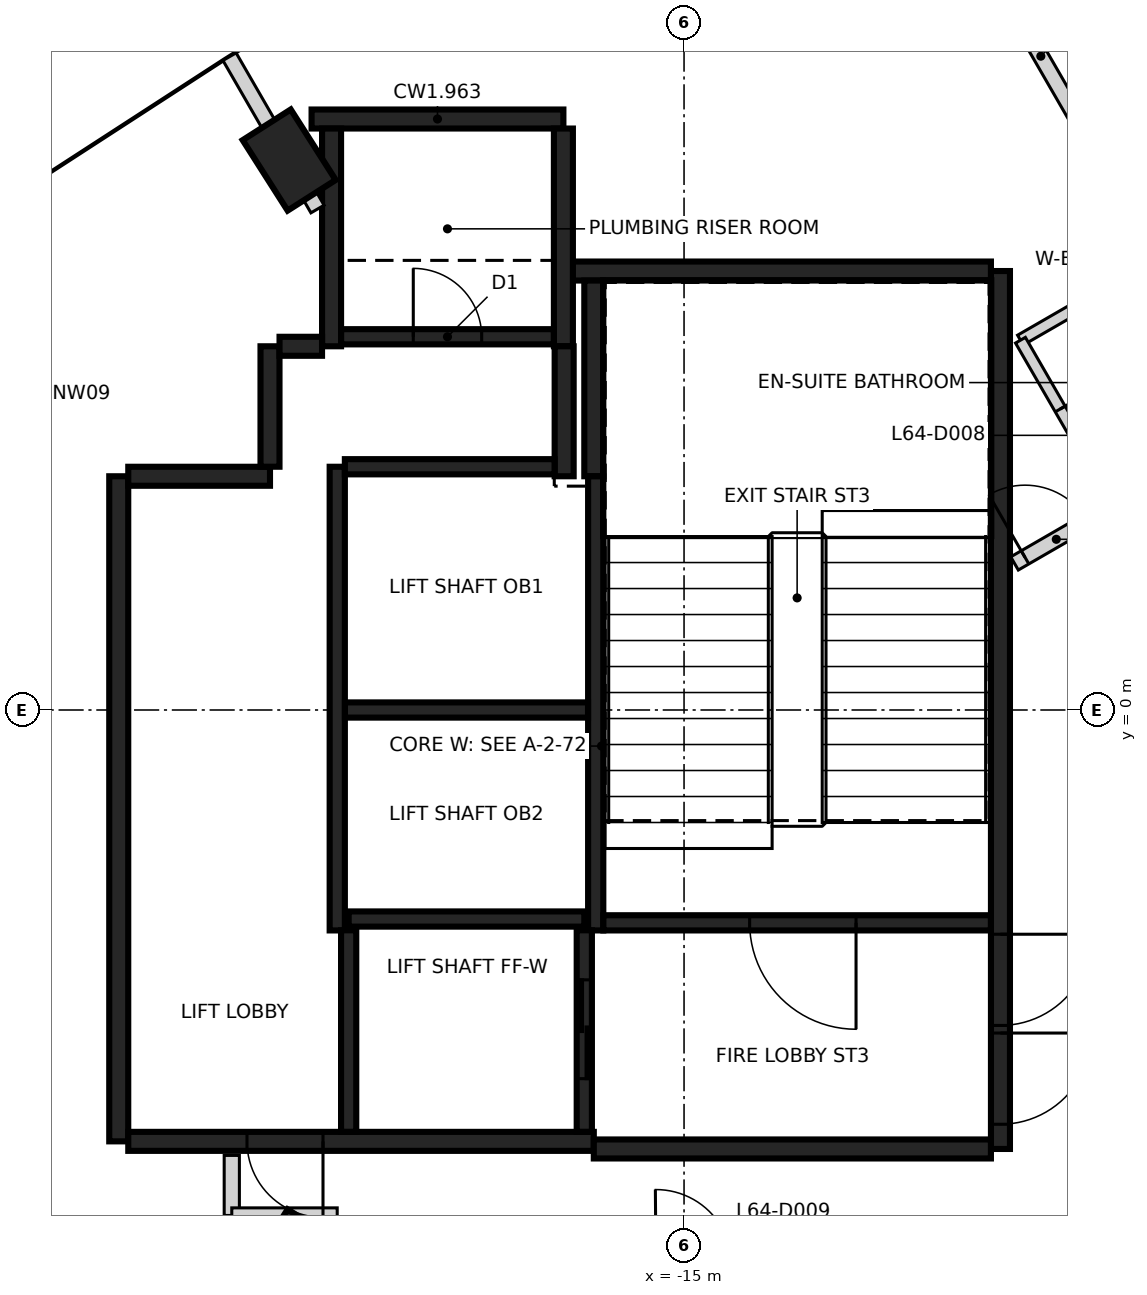
"""IFC4 building model, lengths in metres.
Left out: names, types, materials, properties, quantities, classifications, styles, units other than length and angle.
Written with IfcOpenShell. Run it as: python <this file> out.ifc"""

import sys

from ifc_helpers import new_model, si_unit, direction, frame, frame_2d, origin, origin_2d, place, context, subcontext, project, spatial, rectangle, extrude, element, fill, save


model = new_model("IFC4")
c1 = context("Model", 3, precision=1e-05, world=origin(), true_north=direction((0.0, 1.0)))
c2 = subcontext(c1, "Body", "Model", "MODEL_VIEW")
j1 = project(units=[si_unit("LENGTHUNIT", "METRE"), si_unit("PLANEANGLEUNIT", "RADIAN")], contexts=[c1])
p1 = place(None, origin())
s1 = spatial("IfcSite", under=j1, at=p1, CompositionType="ELEMENT")
p2 = place(p1, origin())
s2 = spatial("IfcBuilding", under=s1, at=p2, CompositionType="ELEMENT")
p3 = place(p2, frame((0.0, 0.0, 253.8)))
s3 = spatial("IfcBuildingStorey", under=s2, at=p3, CompositionType="ELEMENT", Elevation=253.8)
for number, where, z_axis, x_axis in (
    (1, (-20.195, 7.235, -0.35), (0.0, 0.0, 1.0), (-0.538, 0.843, 0.0)),
    (2, (-20.195, -7.235, -0.35), (0.0, 0.0, 1.0), (0.538, 0.843, 0.0)),
):
    element("IfcColumn", number, at=place(p3, frame(where, z_axis=z_axis, x_axis=x_axis)), inside=s3, PredefinedType="COLUMN", context=c2, shape_type="SweptSolid", body=[
        extrude(rectangle(XDim=1.1, YDim=0.75, at=origin_2d()), origin(), (0.0, 0.0, 1.0), 2.64),
    ])
p4 = place(p3, frame((-10.837, 5.775, 0.0), z_axis=(0.0, 0.0, 1.0), x_axis=(0.0, -1.0, 0.0)))
e3 = element("IfcWall", 3, at=p4, inside=s3, PredefinedType="SHEAR", context=c2, shape_type="SweptSolid", body=[
    extrude(rectangle(XDim=11.55, YDim=0.25, at=frame_2d((5.775, 0.0))), origin(), (0.0, 0.0, 1.0), 3.2),
])
p5 = place(p4, frame((10.025, 0.0, 0.0)))
e4 = element("IfcOpeningElement", 4, at=p5, cuts=e3, PredefinedType="OPENING", context=c2, shape_type="SweptSolid", body=[
    extrude(rectangle(XDim=1.2, YDim=2.1, at=frame_2d((0.6, 1.05))), frame((0.0, 0.135, 0.0), z_axis=(0.0, -1.0, 0.0), x_axis=(1.0, 0.0, 0.0)), (0.0, 0.0, 1.0), 0.27),
])
p6 = place(p4, frame((8.725, 0.0, 0.0)))
e5 = element("IfcOpeningElement", 5, at=p6, cuts=e3, PredefinedType="OPENING", context=c2, shape_type="SweptSolid", body=[
    extrude(rectangle(XDim=1.2, YDim=2.1, at=frame_2d((0.6, 1.05))), frame((0.0, 0.135, 0.0), z_axis=(0.0, -1.0, 0.0), x_axis=(1.0, 0.0, 0.0)), (0.0, 0.0, 1.0), 0.27),
])
p7 = place(p3, frame((-22.437, -5.675, 0.0), z_axis=(0.0, 0.0, 1.0), x_axis=(0.0, 1.0, 0.0)))
e6 = element("IfcWall", 6, at=p7, inside=s3, PredefinedType="SHEAR", context=c2, shape_type="SweptSolid", body=[
    extrude(rectangle(XDim=8.75, YDim=0.25, at=frame_2d((4.375, 0.0))), origin(), (0.0, 0.0, 1.0), 3.2),
])
p8 = place(p3, frame((-16.187, -5.675, 0.0), z_axis=(0.0, 0.0, 1.0), x_axis=(-1.0, 0.0, 0.0)))
e7 = element("IfcWall", 7, at=p8, inside=s3, PredefinedType="SHEAR", context=c2, shape_type="SweptSolid", body=[
    extrude(rectangle(XDim=6.125, YDim=0.25, at=frame_2d((3.062, 0.0))), origin(), (0.0, 0.0, 1.0), 3.2),
])
p9 = place(p8, frame((3.563, 0.0, 0.0)))
e8 = element("IfcOpeningElement", 8, at=p9, cuts=e7, PredefinedType="OPENING", context=c2, shape_type="SweptSolid", body=[
    extrude(rectangle(XDim=1.0, YDim=2.1, at=frame_2d((0.5, 1.05))), frame((0.0, 0.135, 0.0), z_axis=(0.0, -1.0, 0.0), x_axis=(1.0, 0.0, 0.0)), (0.0, 0.0, 1.0), 0.27),
])
p10 = place(p3, frame((-10.963, -5.775, 0.0), z_axis=(0.0, 0.0, 1.0), x_axis=(-1.0, 0.0, 0.0)))
e9 = element("IfcWall", 9, at=p10, inside=s3, PredefinedType="SHEAR", context=c2, shape_type="SweptSolid", body=[
    extrude(rectangle(XDim=5.225, YDim=0.25, at=frame_2d((2.612, 0.0))), origin(), (0.0, 0.0, 1.0), 3.2),
])
p11 = place(p3, frame((-16.472, 5.775, 0.0), z_axis=(0.0, 0.0, 1.0), x_axis=(1.0, 0.0, 0.0)))
e10 = element("IfcWall", 10, at=p11, inside=s3, PredefinedType="SHEAR", context=c2, shape_type="SweptSolid", body=[
    extrude(rectangle(XDim=5.51, YDim=0.25, at=frame_2d((2.755, 0.0))), origin(), (0.0, 0.0, 1.0), 3.2),
])
p12 = place(p3, frame((-19.9, 7.775, 0.0), z_axis=(0.0, 0.0, 1.0), x_axis=(1.0, 0.0, 0.0)))
e11 = element("IfcWall", 11, at=p12, inside=s3, PredefinedType="SHEAR", context=c2, shape_type="SweptSolid", body=[
    extrude(rectangle(XDim=3.313, YDim=0.25, at=frame_2d((1.656, 0.0))), origin(), (0.0, 0.0, 1.0), 3.2),
])
for number, where, z_axis, x_axis in (
    (12, (-16.587, 7.65, 0.0), (0.0, 0.0, 1.0), (0.0, -1.0, 0.0)),
    (13, (-19.637, 4.785, 0.0), (0.0, 0.0, 1.0), (0.0, 1.0, 0.0)),
):
    element("IfcWall", number, at=place(p3, frame(where, z_axis=z_axis, x_axis=x_axis)), inside=s3, PredefinedType="SHEAR", context=c2, shape_type="SweptSolid", body=[
        extrude(rectangle(XDim=2.865, YDim=0.25, at=frame_2d((1.432, 0.0))), origin(), (0.0, 0.0, 1.0), 3.2),
    ])
p13 = place(p3, frame((-16.187, 3.075, 0.0), z_axis=(0.0, 0.0, 1.0), x_axis=(0.0, 1.0, 0.0)))
e14 = element("IfcWall", 14, at=p13, inside=s3, PredefinedType="SHEAR", context=c2, shape_type="SweptSolid", body=[
    extrude(rectangle(XDim=2.575, YDim=0.25, at=frame_2d((1.287, 0.0))), origin(), (0.0, 0.0, 1.0), 3.2),
])
p14 = place(p3, frame((-22.312, 3.075, 0.0), z_axis=(0.0, 0.0, 1.0), x_axis=(1.0, 0.0, 0.0)))
e15 = element("IfcWall", 15, at=p14, inside=s3, PredefinedType="SHEAR", context=c2, shape_type="SweptSolid", body=[
    extrude(rectangle(XDim=1.865, YDim=0.25, at=frame_2d((0.932, 0.0))), origin(), (0.0, 0.0, 1.0), 3.2),
])
p15 = place(p3, frame((-16.577, 4.785, 0.0), z_axis=(0.0, 0.0, 1.0), x_axis=(0.0, -1.0, 0.0)))
e16 = element("IfcWall", 16, at=p15, inside=s3, PredefinedType="SHEAR", context=c2, shape_type="SweptSolid", body=[
    extrude(rectangle(XDim=1.71, YDim=0.25, at=frame_2d((0.855, 0.0))), origin(), (0.0, 0.0, 1.0), 3.2),
])
p16 = place(p3, frame((-20.447, 3.2, 0.0), z_axis=(0.0, 0.0, 1.0), x_axis=(0.0, 1.0, 0.0)))
e17 = element("IfcWall", 17, at=p16, inside=s3, PredefinedType="SHEAR", context=c2, shape_type="SweptSolid", body=[
    extrude(rectangle(XDim=1.584, YDim=0.25, at=frame_2d((0.792, 0.0))), origin(), (0.0, 0.0, 1.0), 3.2),
])
p17 = place(p3, frame((-20.322, 4.785, 0.0), z_axis=(0.0, 0.0, 1.0), x_axis=(1.0, 0.0, 0.0)))
e18 = element("IfcWall", 18, at=p17, inside=s3, PredefinedType="SHEAR", context=c2, shape_type="SweptSolid", body=[
    extrude(rectangle(XDim=0.559, YDim=0.25, at=frame_2d((0.28, 0.0))), origin(), (0.0, 0.0, 1.0), 3.2),
])
p18 = place(p3, frame((-16.162, 3.074, 0.0), z_axis=(0.0, 0.0, 1.0), x_axis=(0.0, -1.0, 0.0)))
e19 = element("IfcWall", 19, at=p18, inside=s3, PredefinedType="SHEAR", context=c2, shape_type="SweptSolid", body=[
    extrude(rectangle(XDim=5.974, YDim=0.2, at=frame_2d((2.987, 0.0))), origin(), (0.0, 0.0, 1.0), 3.2),
])
p19 = place(p3, frame((-19.562, -2.9, 0.0), z_axis=(0.0, 0.0, 1.0), x_axis=(0.0, 1.0, 0.0)))
e20 = element("IfcWall", 20, at=p19, inside=s3, PredefinedType="SHEAR", context=c2, shape_type="SweptSolid", body=[
    extrude(rectangle(XDim=6.1, YDim=0.2, at=frame_2d((3.05, 0.0))), origin(), (0.0, 0.0, 1.0), 3.2),
])
p20 = place(p3, frame((-10.963, -2.8, 0.0), z_axis=(0.0, 0.0, 1.0), x_axis=(-1.0, 0.0, 0.0)))
e21 = element("IfcWall", 21, at=p20, inside=s3, PredefinedType="SHEAR", context=c2, shape_type="SweptSolid", body=[
    extrude(rectangle(XDim=5.098, YDim=0.2, at=frame_2d((2.549, 0.0))), origin(), (0.0, 0.0, 1.0), 3.2),
])
p21 = place(p20, frame((1.774, 0.0, 0.0)))
e22 = element("IfcOpeningElement", 22, at=p21, cuts=e21, PredefinedType="OPENING", context=c2, shape_type="SweptSolid", body=[
    extrude(rectangle(XDim=1.4, YDim=2.1, at=frame_2d((0.7, 1.05))), frame((0.0, 0.11, 0.0), z_axis=(0.0, -1.0, 0.0), x_axis=(1.0, 0.0, 0.0)), (0.0, 0.0, 1.0), 0.22),
])
p22 = place(p3, frame((-16.263, 0.0, 0.0), z_axis=(0.0, 0.0, 1.0), x_axis=(-1.0, 0.0, 0.0)))
e23 = element("IfcWall", 23, at=p22, inside=s3, PredefinedType="SHEAR", context=c2, shape_type="SweptSolid", body=[
    extrude(rectangle(XDim=3.198, YDim=0.2, at=frame_2d((1.599, 0.0))), origin(), (0.0, 0.0, 1.0), 3.2),
])
p23 = place(p3, frame((-19.511, 4.91, 0.0), z_axis=(0.0, 0.0, 1.0), x_axis=(1.0, 0.0, 0.0)))
e24 = element("IfcWall", 24, at=p23, inside=s3, PredefinedType="SHEAR", context=c2, shape_type="SweptSolid", body=[
    extrude(rectangle(XDim=2.798, YDim=0.2, at=frame_2d((1.399, 0.0))), origin(), (0.0, 0.0, 1.0), 3.2),
])
p24 = place(p23, frame((0.949, 0.0, 0.0)))
e25 = element("IfcOpeningElement", 25, at=p24, cuts=e24, PredefinedType="OPENING", context=c2, shape_type="SweptSolid", body=[
    extrude(rectangle(XDim=0.9, YDim=2.1, at=frame_2d((0.45, 1.05))), frame((0.0, 0.11, 0.0), z_axis=(0.0, -1.0, 0.0), x_axis=(1.0, 0.0, 0.0)), (0.0, 0.0, 1.0), 0.22),
])
p25 = place(p3, frame((-19.462, 3.2, 0.0), z_axis=(0.0, 0.0, 1.0), x_axis=(1.0, 0.0, 0.0)))
e26 = element("IfcWall", 26, at=p25, inside=s3, PredefinedType="SHEAR", context=c2, shape_type="SweptSolid", body=[
    extrude(rectangle(XDim=2.759, YDim=0.2, at=frame_2d((1.379, 0.0))), origin(), (0.0, 0.0, 1.0), 3.2),
])
p26 = place(p3, frame((-19.412, -2.75, 0.0), z_axis=(0.0, 0.0, 1.0), x_axis=(1.0, 0.0, 0.0)))
e27 = element("IfcWall", 27, at=p26, inside=s3, PredefinedType="SHEAR", context=c2, shape_type="SweptSolid", body=[
    extrude(rectangle(XDim=3.1, YDim=0.2, at=frame_2d((1.55, 0.0))), origin(), (0.0, 0.0, 1.0), 3.2),
])
p27 = place(p3, frame((-16.312, -2.898, 0.0), z_axis=(0.0, 0.0, 1.0), x_axis=(0.0, -1.0, 0.0)))
e28 = element("IfcWall", 28, at=p27, inside=s3, PredefinedType="SHEAR", context=c2, shape_type="SweptSolid", body=[
    extrude(rectangle(XDim=2.651, YDim=0.2, at=frame_2d((1.325, 0.0))), origin(), (0.0, 0.0, 1.0), 3.2),
])
p28 = place(p27, frame((0.652, 0.0, 0.0)))
e29 = element("IfcOpeningElement", 29, at=p28, cuts=e28, PredefinedType="OPENING", context=c2, shape_type="SweptSolid", body=[
    extrude(rectangle(XDim=1.3, YDim=2.1, at=frame_2d((0.65, 1.05))), frame((0.0, 0.11, 0.0), z_axis=(0.0, -1.0, 0.0), x_axis=(1.0, 0.0, 0.0)), (0.0, 0.0, 1.0), 0.22),
])
p29 = place(p3, frame((-19.412, -5.549, 0.0), z_axis=(0.0, 0.0, 1.0), x_axis=(0.0, 1.0, 0.0)))
e30 = element("IfcWall", 30, at=p29, inside=s3, PredefinedType="SHEAR", context=c2, shape_type="SweptSolid", body=[
    extrude(rectangle(XDim=2.651, YDim=0.2, at=frame_2d((1.325, 0.0))), origin(), (0.0, 0.0, 1.0), 3.2),
])
p30 = place(p3, frame((-20.95, -6.65, 0.0), z_axis=(0.0, 0.0, 1.0), x_axis=(0.0, 1.0, 0.0)))
e31 = element("IfcWall", 31, at=p30, inside=s3, PredefinedType="PARTITIONING", context=c2, shape_type="SweptSolid", body=[
    extrude(rectangle(XDim=0.79, YDim=0.2, at=frame_2d((0.395, 0.0))), origin(), (0.0, 0.0, 1.0), 3.2),
])
p31 = place(p3, frame((-20.95, -6.65, 0.0), z_axis=(0.0, 0.0, 1.0), x_axis=(1.0, 0.0, 0.0)))
e32 = element("IfcWall", 32, at=p31, inside=s3, PredefinedType="PARTITIONING", context=c2, shape_type="SweptSolid", body=[
    extrude(rectangle(XDim=1.387, YDim=0.2, at=frame_2d((0.693, 0.0))), origin(), (0.0, 0.0, 1.0), 3.2),
])
p32 = place(p3, frame((-10.652, 1.928, 0.0), z_axis=(0.0, 0.0, 1.0), x_axis=(0.865793573301, 0.500401327367, 0.0)))
e33 = element("IfcWall", 33, at=p32, inside=s3, PredefinedType="PARTITIONING", context=c2, shape_type="SweptSolid", body=[
    extrude(rectangle(XDim=12.886, YDim=0.2, at=frame_2d((6.443, 0.0))), origin(), (0.0, 0.0, 1.0), 3.2),
])
p33 = place(p32, frame((7.123, 0.0, 0.0)))
e34 = element("IfcOpeningElement", 34, at=p33, cuts=e33, PredefinedType="OPENING", context=c2, shape_type="SweptSolid", body=[
    extrude(rectangle(XDim=0.95, YDim=2.1, at=frame_2d((0.475, 1.05))), frame((0.0, 0.11, 0.0), z_axis=(0.0, -1.0, 0.0), x_axis=(1.0, 0.0, 0.0)), (0.0, 0.0, 1.0), 0.22),
])
p34 = place(p32, frame((0.16, 0.0, 0.0)))
e35 = element("IfcOpeningElement", 35, at=p34, cuts=e33, PredefinedType="OPENING", context=c2, shape_type="SweptSolid", body=[
    extrude(rectangle(XDim=0.95, YDim=2.1, at=frame_2d((0.475, 1.05))), frame((0.0, 0.11, 0.0), z_axis=(0.0, -1.0, 0.0), x_axis=(1.0, 0.0, 0.0)), (0.0, 0.0, 1.0), 0.22),
])
p35 = place(p3, frame((-20.979, 8.595, 0.0), z_axis=(0.0, 0.0, 1.0), x_axis=(0.499950711303, -0.866053858757, 0.0)))
e36 = element("IfcWall", 36, at=p35, inside=s3, PredefinedType="PARTITIONING", context=c2, shape_type="SweptSolid", body=[
    extrude(rectangle(XDim=2.315, YDim=0.2, at=frame_2d((1.157, 0.0))), origin(), (0.0, 0.0, 1.0), 3.2),
])
p36 = place(p3, frame((-13.107, 13.453, 0.0), z_axis=(0.0, 0.0, 1.0), x_axis=(0.50003870279, -0.866003057565, 0.0)))
e37 = element("IfcWall", 37, at=p36, inside=s3, PredefinedType="PARTITIONING", context=c2, shape_type="SweptSolid", body=[
    extrude(rectangle(XDim=11.204, YDim=0.2, at=frame_2d((5.602, 0.0))), origin(), (0.0, 0.0, 1.0), 3.2),
])
p37 = place(p3, frame((-13.107, -13.453, 0.0), z_axis=(0.0, 0.0, 1.0), x_axis=(0.500058218288, 0.865991788831, 0.0)))
e38 = element("IfcWall", 38, at=p37, inside=s3, PredefinedType="PARTITIONING", context=c2, shape_type="SweptSolid", body=[
    extrude(rectangle(XDim=9.735, YDim=0.2, at=frame_2d((4.867, 0.0))), origin(), (0.0, 0.0, 1.0), 3.2),
])
p38 = place(p3, frame((-10.574, 4.866, 0.0), z_axis=(0.0, 0.0, 1.0), x_axis=(0.866052994476, 0.499952208475, 0.0)))
e39 = element("IfcWall", 39, at=p38, inside=s3, PredefinedType="PARTITIONING", context=c2, shape_type="SweptSolid", body=[
    extrude(rectangle(XDim=4.201, YDim=0.15, at=frame_2d((2.1, 0.0))), origin(), (0.0, 0.0, 1.0), 3.2),
])
p39 = place(p3, frame((-10.574, 4.865, 0.0), z_axis=(0.0, 0.0, 1.0), x_axis=(0.500004234368, -0.866022959057, 0.0)))
e40 = element("IfcWall", 40, at=p39, inside=s3, PredefinedType="PARTITIONING", context=c2, shape_type="SweptSolid", body=[
    extrude(rectangle(XDim=2.5, YDim=0.15, at=frame_2d((1.25, 0.0))), origin(), (0.0, 0.0, 1.0), 3.2),
])
p40 = place(p39, frame((1.045, 0.0, 0.0)))
e41 = element("IfcOpeningElement", 41, at=p40, cuts=e40, PredefinedType="OPENING", context=c2, shape_type="SweptSolid", body=[
    extrude(rectangle(XDim=0.8, YDim=2.1, at=frame_2d((0.4, 1.05))), frame((0.0, 0.085, 0.0), z_axis=(0.0, -1.0, 0.0), x_axis=(1.0, 0.0, 0.0)), (0.0, 0.0, 1.0), 0.17),
])
p41 = place(p28, origin())
e42 = element("IfcDoor", 42, at=p41, inside=s3, OperationType="SLIDING_TO_LEFT", PredefinedType="DOOR", context=c2, shape_type="SweptSolid", body=[
    extrude(rectangle(XDim=1.3, YDim=2.1, at=frame_2d((0.65, 1.05))), frame((0.0, 0.025, 0.0), z_axis=(0.0, -1.0, 0.0), x_axis=(1.0, 0.0, 0.0)), (0.0, 0.0, 1.0), 0.05),
])
fill(e29, e42)
p42 = place(p9, origin())
e43 = element("IfcDoor", 43, at=p42, inside=s3, OperationType="SINGLE_SWING_LEFT", PredefinedType="DOOR", context=c2, shape_type="SweptSolid", body=[
    extrude(rectangle(XDim=1.0, YDim=2.1, at=frame_2d((0.5, 1.05))), frame((0.0, 0.025, 0.0), z_axis=(0.0, -1.0, 0.0), x_axis=(1.0, 0.0, 0.0)), (0.0, 0.0, 1.0), 0.05),
])
fill(e8, e43)
p43 = place(p5, origin())
e44 = element("IfcDoor", 44, at=p43, inside=s3, OperationType="SINGLE_SWING_LEFT", PredefinedType="DOOR", context=c2, shape_type="SweptSolid", body=[
    extrude(rectangle(XDim=1.2, YDim=2.1, at=frame_2d((0.6, 1.05))), frame((0.0, 0.025, 0.0), z_axis=(0.0, -1.0, 0.0), x_axis=(1.0, 0.0, 0.0)), (0.0, 0.0, 1.0), 0.05),
])
fill(e4, e44)
p44 = place(p6, origin())
e45 = element("IfcDoor", 45, at=p44, inside=s3, OperationType="SINGLE_SWING_RIGHT", PredefinedType="DOOR", context=c2, shape_type="SweptSolid", body=[
    extrude(rectangle(XDim=1.2, YDim=2.1, at=frame_2d((0.6, 1.05))), frame((0.0, 0.025, 0.0), z_axis=(0.0, -1.0, 0.0), x_axis=(1.0, 0.0, 0.0)), (0.0, 0.0, 1.0), 0.05),
])
fill(e5, e45)
p45 = place(p21, origin())
e46 = element("IfcDoor", 46, at=p45, inside=s3, OperationType="SINGLE_SWING_LEFT", PredefinedType="DOOR", context=c2, shape_type="SweptSolid", body=[
    extrude(rectangle(XDim=1.4, YDim=2.1, at=frame_2d((0.7, 1.05))), frame((0.0, 0.025, 0.0), z_axis=(0.0, -1.0, 0.0), x_axis=(1.0, 0.0, 0.0)), (0.0, 0.0, 1.0), 0.05),
])
fill(e22, e46)
p46 = place(p24, origin())
e47 = element("IfcDoor", 47, at=p46, inside=s3, OperationType="SINGLE_SWING_RIGHT", PredefinedType="DOOR", context=c2, shape_type="SweptSolid", body=[
    extrude(rectangle(XDim=0.9, YDim=2.1, at=frame_2d((0.45, 1.05))), frame((0.0, 0.025, 0.0), z_axis=(0.0, -1.0, 0.0), x_axis=(1.0, 0.0, 0.0)), (0.0, 0.0, 1.0), 0.05),
])
fill(e25, e47)
p47 = place(p34, origin())
e48 = element("IfcDoor", 48, at=p47, inside=s3, OperationType="SINGLE_SWING_LEFT", PredefinedType="DOOR", context=c2, shape_type="SweptSolid", body=[
    extrude(rectangle(XDim=0.95, YDim=2.1, at=frame_2d((0.475, 1.05))), frame((0.0, 0.025, 0.0), z_axis=(0.0, -1.0, 0.0), x_axis=(1.0, 0.0, 0.0)), (0.0, 0.0, 1.0), 0.05),
])
fill(e35, e48)
p48 = place(p40, frame((0.8, 0.0, 0.0), z_axis=(0.0, 0.0, 1.0), x_axis=(-1.0, 0.0, 0.0)))
e49 = element("IfcDoor", 49, at=p48, inside=s3, OperationType="SINGLE_SWING_LEFT", PredefinedType="DOOR", context=c2, shape_type="SweptSolid", body=[
    extrude(rectangle(XDim=0.8, YDim=2.1, at=frame_2d((0.4, 1.05))), frame((0.0, 0.025, 0.0), z_axis=(0.0, -1.0, 0.0), x_axis=(1.0, 0.0, 0.0)), (0.0, 0.0, 1.0), 0.05),
])
fill(e41, e49)
save(model, sys.argv[1])
